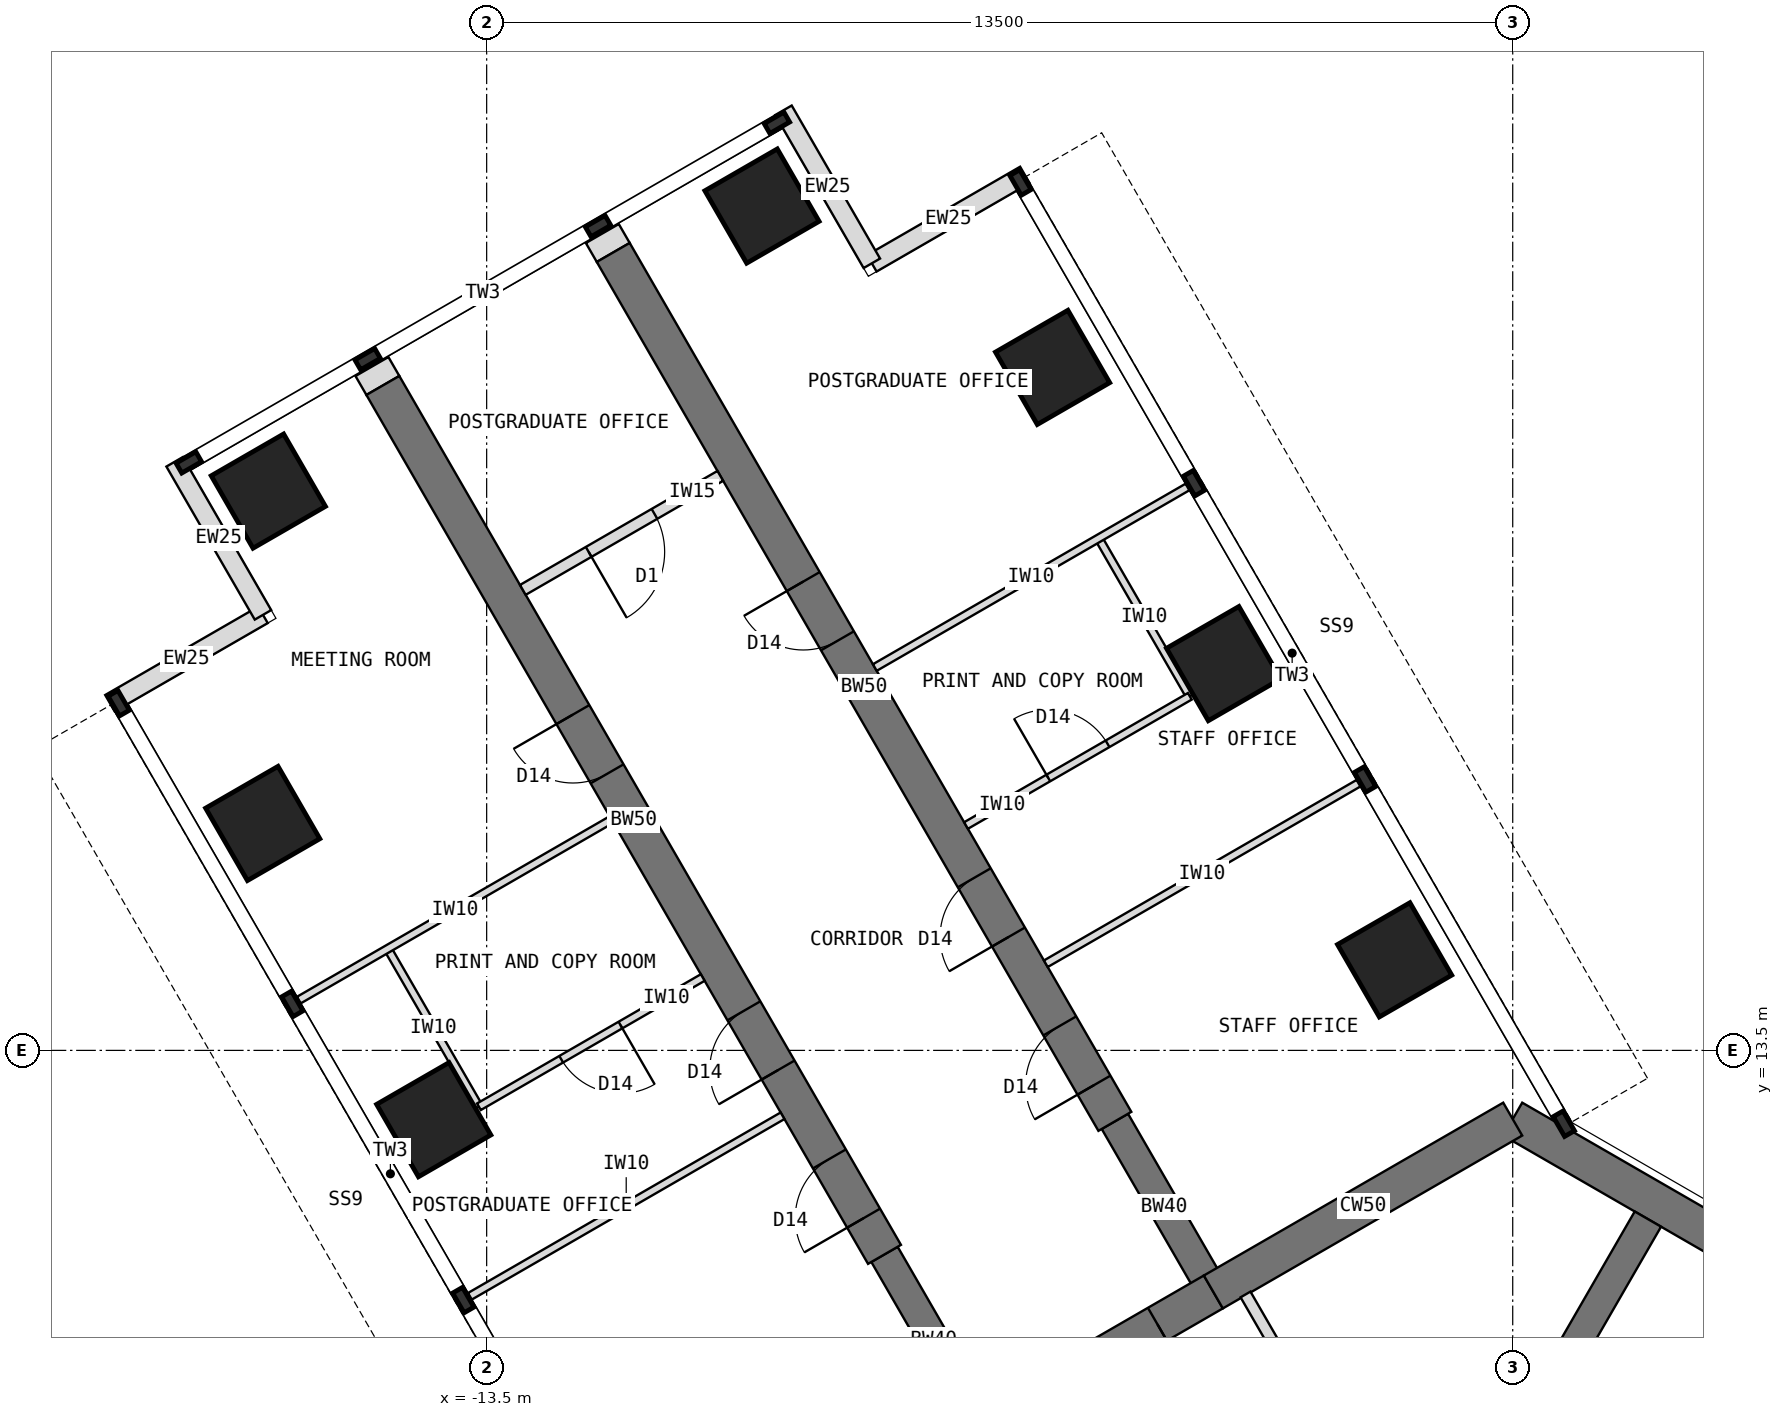
"""IFC4 building model, lengths in metres.
Left out: names, types, materials, properties, quantities, classifications, styles, units other than length and angle.
Written with IfcOpenShell. Run it as: python <this file> out.ifc"""

import sys

from ifc_helpers import new_model, si_unit, direction, frame, frame_2d, origin, origin_2d, place, context, subcontext, project, spatial, rectangle, extrude, element, fill, save


model = new_model("IFC4")
c1 = context("Model", 3, precision=1e-05, world=origin(), true_north=direction((0.0, 1.0)))
c2 = subcontext(c1, "Body", "Model", "MODEL_VIEW")
j1 = project(units=[si_unit("LENGTHUNIT", "METRE"), si_unit("PLANEANGLEUNIT", "RADIAN")], contexts=[c1])
p1 = place(None, origin())
s1 = spatial("IfcSite", under=j1, at=p1, CompositionType="ELEMENT")
p2 = place(p1, origin())
s2 = spatial("IfcBuilding", under=s1, at=p2, CompositionType="ELEMENT")
p3 = place(p2, frame((0.0, 0.0, 230.5)))
s3 = spatial("IfcBuildingStorey", under=s2, at=p3, CompositionType="ELEMENT", Elevation=230.5)
p4 = place(p3, frame((10.908, 6.298, 0.0), z_axis=(0.0, 0.0, 1.0), x_axis=(-0.866021940709, 0.500005998175, 0.0)))
e1 = element("IfcWall", 1, at=p4, inside=s3, PredefinedType="SHEAR", context=c2, shape_type="SweptSolid", body=[
    extrude(rectangle(XDim=12.596, YDim=0.5, at=frame_2d((6.298, 0.0))), origin(), (0.0, 0.0, 1.0), 4.0),
])
p5 = place(p3, frame((0.0, 12.596, 0.0), z_axis=(0.0, 0.0, 1.0), x_axis=(-0.866011268655, -0.500024481964, 0.0)))
e2 = element("IfcWall", 2, at=p5, inside=s3, PredefinedType="SHEAR", context=c2, shape_type="SweptSolid", body=[
    extrude(rectangle(XDim=4.548, YDim=0.5, at=frame_2d((2.274, 0.0))), origin(), (0.0, 0.0, 1.0), 4.0),
])
p6 = place(p3, frame((-3.939, 10.322, 0.0), z_axis=(0.0, 0.0, 1.0), x_axis=(-0.866019471182, -0.500010275428, 0.0)))
e3 = element("IfcWall", 3, at=p6, inside=s3, PredefinedType="SHEAR", context=c2, shape_type="SweptSolid", body=[
    extrude(rectangle(XDim=3.5, YDim=0.5, at=frame_2d((1.75, 0.0))), origin(), (0.0, 0.0, 1.0), 4.0),
])
p7 = place(p6, frame((0.85, 0.0, 0.0)))
e4 = element("IfcOpeningElement", 4, at=p7, cuts=e3, PredefinedType="OPENING", context=c2, shape_type="SweptSolid", body=[
    extrude(rectangle(XDim=1.8, YDim=2.1, at=frame_2d((0.9, 1.05))), frame((0.0, 0.26, 0.0), z_axis=(0.0, -1.0, 0.0), x_axis=(1.0, 0.0, 0.0)), (0.0, 0.0, 1.0), 0.52),
])
p8 = place(p3, frame((-6.97, 8.572, 0.0), z_axis=(0.0, 0.0, 1.0), x_axis=(-0.499988811324, 0.866031863473, 0.0)))
e5 = element("IfcWall", 5, at=p8, inside=s3, PredefinedType="SHEAR", context=c2, shape_type="SweptSolid", body=[
    extrude(rectangle(XDim=2.592, YDim=0.4, at=frame_2d((1.296, 0.0))), origin(), (0.0, 0.0, 1.0), 4.0),
])
p9 = place(p3, frame((-8.266, 10.816, 0.0), z_axis=(0.0, 0.0, 1.0), x_axis=(-0.499996231654, 0.866027579429, 0.0)))
e6 = element("IfcWall", 6, at=p9, inside=s3, PredefinedType="SHEAR", context=c2, shape_type="SweptSolid", body=[
    extrude(rectangle(XDim=13.2, YDim=0.5, at=frame_2d((6.6, 0.0))), origin(), (0.0, 0.0, 1.0), 4.0),
])
p10 = place(p9, frame((0.55, 0.0, 0.0)))
e7 = element("IfcOpeningElement", 7, at=p10, cuts=e6, PredefinedType="OPENING", context=c2, shape_type="SweptSolid", body=[
    extrude(rectangle(XDim=0.9, YDim=2.1, at=frame_2d((0.45, 1.05))), frame((0.0, 0.26, 0.0), z_axis=(0.0, -1.0, 0.0), x_axis=(1.0, 0.0, 0.0)), (0.0, 0.0, 1.0), 0.52),
])
p11 = place(p9, frame((2.8, 0.0, 0.0)))
e8 = element("IfcOpeningElement", 8, at=p11, cuts=e6, PredefinedType="OPENING", context=c2, shape_type="SweptSolid", body=[
    extrude(rectangle(XDim=0.9, YDim=2.1, at=frame_2d((0.45, 1.05))), frame((0.0, 0.26, 0.0), z_axis=(0.0, -1.0, 0.0), x_axis=(1.0, 0.0, 0.0)), (0.0, 0.0, 1.0), 0.52),
])
p12 = place(p9, frame((7.3, 0.0, 0.0)))
e9 = element("IfcOpeningElement", 9, at=p12, cuts=e6, PredefinedType="OPENING", context=c2, shape_type="SweptSolid", body=[
    extrude(rectangle(XDim=0.9, YDim=2.1, at=frame_2d((0.45, 1.05))), frame((0.0, 0.26, 0.0), z_axis=(0.0, -1.0, 0.0), x_axis=(1.0, 0.0, 0.0)), (0.0, 0.0, 1.0), 0.52),
])
p13 = place(p3, frame((-3.939, 10.322, 0.0), z_axis=(0.0, 0.0, 1.0), x_axis=(-0.499918158782, 0.866072649678, 0.0)))
e10 = element("IfcWall", 10, at=p13, inside=s3, PredefinedType="SHEAR", context=c2, shape_type="SweptSolid", body=[
    extrude(rectangle(XDim=2.592, YDim=0.4, at=frame_2d((1.296, 0.0))), origin(), (0.0, 0.0, 1.0), 4.0),
])
p14 = place(p3, frame((-5.234, 12.566, 0.0), z_axis=(0.0, 0.0, 1.0), x_axis=(-0.500010103361, 0.866019570528, 0.0)))
e11 = element("IfcWall", 11, at=p14, inside=s3, PredefinedType="SHEAR", context=c2, shape_type="SweptSolid", body=[
    extrude(rectangle(XDim=13.2, YDim=0.5, at=frame_2d((6.6, 0.0))), origin(), (0.0, 0.0, 1.0), 4.0),
])
p15 = place(p14, frame((0.55, 0.0, 0.0)))
e12 = element("IfcOpeningElement", 12, at=p15, cuts=e11, PredefinedType="OPENING", context=c2, shape_type="SweptSolid", body=[
    extrude(rectangle(XDim=0.9, YDim=2.1, at=frame_2d((0.45, 1.05))), frame((0.0, 0.26, 0.0), z_axis=(0.0, -1.0, 0.0), x_axis=(1.0, 0.0, 0.0)), (0.0, 0.0, 1.0), 0.52),
])
p16 = place(p14, frame((2.8, 0.0, 0.0)))
e13 = element("IfcOpeningElement", 13, at=p16, cuts=e11, PredefinedType="OPENING", context=c2, shape_type="SweptSolid", body=[
    extrude(rectangle(XDim=0.9, YDim=2.1, at=frame_2d((0.45, 1.05))), frame((0.0, 0.26, 0.0), z_axis=(0.0, -1.0, 0.0), x_axis=(1.0, 0.0, 0.0)), (0.0, 0.0, 1.0), 0.52),
])
p17 = place(p14, frame((7.3, 0.0, 0.0)))
e14 = element("IfcOpeningElement", 14, at=p17, cuts=e11, PredefinedType="OPENING", context=c2, shape_type="SweptSolid", body=[
    extrude(rectangle(XDim=0.9, YDim=2.1, at=frame_2d((0.45, 1.05))), frame((0.0, 0.26, 0.0), z_axis=(0.0, -1.0, 0.0), x_axis=(1.0, 0.0, 0.0)), (0.0, 0.0, 1.0), 0.52),
])
for number, where, z_axis, x_axis in (
    (15, (-1.554, 14.691, 0.0), (0.0, 0.0, 1.0), (0.866, 0.5, 0.0)),
    (16, (-14.196, 12.588, 0.0), (0.0, 0.0, 1.0), (0.866, 0.5, 0.0)),
    (17, (-3.804, 18.588, 0.0), (0.0, 0.0, 1.0), (0.866, 0.5, 0.0)),
    (18, (-16.446, 16.486, 0.0), (0.0, 0.0, 1.0), (0.866, 0.5, 0.0)),
    (19, (-6.054, 22.486, 0.0), (0.0, 0.0, 1.0), (0.866, 0.5, 0.0)),
    (20, (-16.373, 20.858, 0.0), (0.0, 0.0, 1.0), (0.866, 0.5, 0.0)),
    (21, (-9.877, 24.608, 0.0), (0.0, 0.0, 1.0), (0.866, 0.5, 0.0)),
):
    element("IfcColumn", number, at=place(p3, frame(where, z_axis=z_axis, x_axis=x_axis)), inside=s3, PredefinedType="COLUMN", context=c2, shape_type="SweptSolid", body=[
        extrude(rectangle(XDim=1.1, YDim=1.1, at=origin_2d()), origin(), (0.0, 0.0, 1.0), 4.0),
    ])
for number, where, z_axis, x_axis in (
    (22, (-18.456, 18.067, 0.0), (0.0, 0.0, 1.0), (0.866, 0.5, 0.0)),
    (23, (-16.443, 19.23, 0.0), (0.0, 0.0, 1.0), (-0.5, 0.866, 0.0)),
    (24, (-6.419, 25.017, 0.0), (0.0, 0.0, 1.0), (-0.866, -0.5, 0.0)),
    (25, (-8.432, 23.855, 0.0), (0.0, 0.0, 1.0), (-0.5, 0.866, 0.0)),
):
    element("IfcWall", number, at=place(p3, frame(where, z_axis=z_axis, x_axis=x_axis)), inside=s3, PredefinedType="STANDARD", context=c2, shape_type="SweptSolid", body=[
        extrude(rectangle(XDim=2.325, YDim=0.25, at=frame_2d((1.163, 0.0))), origin(), (0.0, 0.0, 1.0), 3.8),
    ])
for number, where, z_axis, x_axis in (
    (26, (-14.865, 22.248, 0.0), (0.0, 0.0, 1.0), (-0.5, 0.866, 0.0)),
    (27, (-11.834, 23.998, 0.0), (0.0, 0.0, 1.0), (-0.5, 0.866, 0.0)),
):
    element("IfcWall", number, at=place(p3, frame(where, z_axis=z_axis, x_axis=x_axis)), inside=s3, PredefinedType="PARTITIONING", context=c2, shape_type="SweptSolid", body=[
        extrude(rectangle(XDim=0.288, YDim=0.5, at=frame_2d((0.144, 0.0))), origin(), (0.0, 0.0, 1.0), 3.8),
    ])
p18 = place(p3, frame((-1.201, 6.12, 0.0), z_axis=(0.0, 0.0, 1.0), x_axis=(0.500021575205, 0.866012946976, 0.0)))
e28 = element("IfcWall", 28, at=p18, inside=s3, PredefinedType="SHEAR", context=c2, shape_type="SweptSolid", body=[
    extrude(rectangle(XDim=5.958, YDim=0.4, at=frame_2d((2.979, 0.0))), origin(), (0.0, 0.0, 1.0), 4.0),
])
for number, where, z_axis, x_axis in (
    (29, (-9.607, 12.64, 0.0), (0.0, 0.0, 1.0), (-0.866, -0.5, 0.0)),
    (30, (-11.857, 16.537, 0.0), (0.0, 0.0, 1.0), (-0.866, -0.5, 0.0)),
):
    element("IfcWall", number, at=place(p3, frame(where, z_axis=z_axis, x_axis=x_axis)), inside=s3, PredefinedType="PARTITIONING", context=c2, shape_type="SweptSolid", body=[
        extrude(rectangle(XDim=4.75, YDim=0.1, at=frame_2d((2.375, 0.0))), origin(), (0.0, 0.0, 1.0), 3.8),
    ])
p19 = place(p3, frame((-13.602, 12.759, 0.0), z_axis=(0.0, 0.0, 1.0), x_axis=(-0.500001309137, 0.866024647952, 0.0)))
e31 = element("IfcWall", 31, at=p19, inside=s3, PredefinedType="PARTITIONING", context=c2, shape_type="SweptSolid", body=[
    extrude(rectangle(XDim=2.4, YDim=0.1, at=frame_2d((1.2, 0.0))), origin(), (0.0, 0.0, 1.0), 3.8),
])
p20 = place(p3, frame((-10.657, 14.458, 0.0), z_axis=(0.0, 0.0, 1.0), x_axis=(-0.866038511948, -0.499977295307, 0.0)))
e32 = element("IfcWall", 32, at=p20, inside=s3, PredefinedType="PARTITIONING", context=c2, shape_type="SweptSolid", body=[
    extrude(rectangle(XDim=3.4, YDim=0.1, at=frame_2d((1.7, 0.0))), origin(), (0.0, 0.0, 1.0), 3.8),
])
p21 = place(p20, frame((1.25, 0.0, 0.0)))
e33 = element("IfcOpeningElement", 33, at=p21, cuts=e32, PredefinedType="OPENING", context=c2, shape_type="SweptSolid", body=[
    extrude(rectangle(XDim=0.9, YDim=2.1, at=frame_2d((0.45, 1.05))), frame((0.0, 0.06, 0.0), z_axis=(0.0, -1.0, 0.0), x_axis=(1.0, 0.0, 0.0)), (0.0, 0.0, 1.0), 0.12),
])
for number, where, z_axis, x_axis in (
    (34, (-6.143, 14.64, 0.0), (0.0, 0.0, 1.0), (0.866, 0.5, 0.0)),
    (35, (-8.393, 18.537, 0.0), (0.0, 0.0, 1.0), (0.866, 0.5, 0.0)),
):
    element("IfcWall", number, at=place(p3, frame(where, z_axis=z_axis, x_axis=x_axis)), inside=s3, PredefinedType="PARTITIONING", context=c2, shape_type="SweptSolid", body=[
        extrude(rectangle(XDim=4.75, YDim=0.1, at=frame_2d((2.375, 0.0))), origin(), (0.0, 0.0, 1.0), 3.8),
    ])
p22 = place(p3, frame((-4.249, 18.158, 0.0), z_axis=(0.0, 0.0, 1.0), x_axis=(-0.499957262057, 0.866050077142, 0.0)))
e36 = element("IfcWall", 36, at=p22, inside=s3, PredefinedType="PARTITIONING", context=c2, shape_type="SweptSolid", body=[
    extrude(rectangle(XDim=2.4, YDim=0.1, at=frame_2d((1.2, 0.0))), origin(), (0.0, 0.0, 1.0), 3.8),
])
p23 = place(p3, frame((-7.193, 16.458, 0.0), z_axis=(0.0, 0.0, 1.0), x_axis=(0.866020560687, 0.500008388397, 0.0)))
e37 = element("IfcWall", 37, at=p23, inside=s3, PredefinedType="PARTITIONING", context=c2, shape_type="SweptSolid", body=[
    extrude(rectangle(XDim=3.4, YDim=0.1, at=frame_2d((1.7, 0.0))), origin(), (0.0, 0.0, 1.0), 3.8),
])
p24 = place(p23, frame((1.25, 0.0, 0.0)))
e38 = element("IfcOpeningElement", 38, at=p24, cuts=e37, PredefinedType="OPENING", context=c2, shape_type="SweptSolid", body=[
    extrude(rectangle(XDim=0.9, YDim=2.1, at=frame_2d((0.45, 1.05))), frame((0.0, 0.06, 0.0), z_axis=(0.0, -1.0, 0.0), x_axis=(1.0, 0.0, 0.0)), (0.0, 0.0, 1.0), 0.12),
])
p25 = place(p3, frame((-3.515, 10.289, 0.0), z_axis=(0.0, 0.0, 1.0), x_axis=(0.499968392031, -0.866043651885, 0.0)))
e39 = element("IfcWall", 39, at=p25, inside=s3, PredefinedType="PARTITIONING", context=c2, shape_type="SweptSolid", body=[
    extrude(rectangle(XDim=4.526, YDim=0.15, at=frame_2d((2.263, 0.0))), origin(), (0.0, 0.0, 1.0), 3.8),
])
p26 = place(p25, frame((2.668, 0.0, 0.0)))
e40 = element("IfcOpeningElement", 40, at=p26, cuts=e39, PredefinedType="OPENING", context=c2, shape_type="SweptSolid", body=[
    extrude(rectangle(XDim=1.0, YDim=2.1, at=frame_2d((0.5, 1.05))), frame((0.0, 0.085, 0.0), z_axis=(0.0, -1.0, 0.0), x_axis=(1.0, 0.0, 0.0)), (0.0, 0.0, 1.0), 0.17),
])
p27 = place(p3, frame((-10.426, 21.058, 0.0), z_axis=(0.0, 0.0, 1.0), x_axis=(-0.866010750942, -0.50002537861, 0.0)))
e41 = element("IfcWall", 41, at=p27, inside=s3, PredefinedType="PARTITIONING", context=c2, shape_type="SweptSolid", body=[
    extrude(rectangle(XDim=3.0, YDim=0.15, at=frame_2d((1.5, 0.0))), origin(), (0.0, 0.0, 1.0), 3.8),
])
p28 = place(p27, frame((1.0, 0.0, 0.0)))
e42 = element("IfcOpeningElement", 42, at=p28, cuts=e41, PredefinedType="OPENING", context=c2, shape_type="SweptSolid", body=[
    extrude(rectangle(XDim=1.0, YDim=2.1, at=frame_2d((0.5, 1.05))), frame((0.0, 0.085, 0.0), z_axis=(0.0, -1.0, 0.0), x_axis=(1.0, 0.0, 0.0)), (0.0, 0.0, 1.0), 0.17),
])
p29 = place(p7, origin())
e43 = element("IfcDoor", 43, at=p29, inside=s3, OperationType="DOUBLE_DOOR_DOUBLE_SWING", PredefinedType="DOOR", context=c2, shape_type="SweptSolid", body=[
    extrude(rectangle(XDim=1.8, YDim=2.1, at=frame_2d((0.9, 1.05))), frame((0.0, 0.025, 0.0), z_axis=(0.0, -1.0, 0.0), x_axis=(1.0, 0.0, 0.0)), (0.0, 0.0, 1.0), 0.05),
])
fill(e4, e43)
p30 = place(p21, origin())
e44 = element("IfcDoor", 44, at=p30, inside=s3, OperationType="SINGLE_SWING_LEFT", PredefinedType="DOOR", context=c2, shape_type="SweptSolid", body=[
    extrude(rectangle(XDim=0.9, YDim=2.1, at=frame_2d((0.45, 1.05))), frame((0.0, 0.025, 0.0), z_axis=(0.0, -1.0, 0.0), x_axis=(1.0, 0.0, 0.0)), (0.0, 0.0, 1.0), 0.05),
])
fill(e33, e44)
p31 = place(p24, origin())
e45 = element("IfcDoor", 45, at=p31, inside=s3, OperationType="SINGLE_SWING_LEFT", PredefinedType="DOOR", context=c2, shape_type="SweptSolid", body=[
    extrude(rectangle(XDim=0.9, YDim=2.1, at=frame_2d((0.45, 1.05))), frame((0.0, 0.025, 0.0), z_axis=(0.0, -1.0, 0.0), x_axis=(1.0, 0.0, 0.0)), (0.0, 0.0, 1.0), 0.05),
])
fill(e38, e45)
p32 = place(p28, origin())
e46 = element("IfcDoor", 46, at=p32, inside=s3, OperationType="SINGLE_SWING_RIGHT", PredefinedType="DOOR", context=c2, shape_type="SweptSolid", body=[
    extrude(rectangle(XDim=1.0, YDim=2.1, at=frame_2d((0.5, 1.05))), frame((0.0, 0.025, 0.0), z_axis=(0.0, -1.0, 0.0), x_axis=(1.0, 0.0, 0.0)), (0.0, 0.0, 1.0), 0.05),
])
fill(e42, e46)
p33 = place(p10, origin())
e47 = element("IfcDoor", 47, at=p33, inside=s3, OperationType="SINGLE_SWING_LEFT", PredefinedType="DOOR", context=c2, shape_type="SweptSolid", body=[
    extrude(rectangle(XDim=0.9, YDim=2.1, at=frame_2d((0.45, 1.05))), frame((0.0, 0.025, 0.0), z_axis=(0.0, -1.0, 0.0), x_axis=(1.0, 0.0, 0.0)), (0.0, 0.0, 1.0), 0.05),
])
fill(e7, e47)
p34 = place(p11, origin())
e48 = element("IfcDoor", 48, at=p34, inside=s3, OperationType="SINGLE_SWING_LEFT", PredefinedType="DOOR", context=c2, shape_type="SweptSolid", body=[
    extrude(rectangle(XDim=0.9, YDim=2.1, at=frame_2d((0.45, 1.05))), frame((0.0, 0.025, 0.0), z_axis=(0.0, -1.0, 0.0), x_axis=(1.0, 0.0, 0.0)), (0.0, 0.0, 1.0), 0.05),
])
fill(e8, e48)
p35 = place(p12, origin())
e49 = element("IfcDoor", 49, at=p35, inside=s3, OperationType="SINGLE_SWING_RIGHT", PredefinedType="DOOR", context=c2, shape_type="SweptSolid", body=[
    extrude(rectangle(XDim=0.9, YDim=2.1, at=frame_2d((0.45, 1.05))), frame((0.0, 0.025, 0.0), z_axis=(0.0, -1.0, 0.0), x_axis=(1.0, 0.0, 0.0)), (0.0, 0.0, 1.0), 0.05),
])
fill(e9, e49)
p36 = place(p15, origin())
e50 = element("IfcDoor", 50, at=p36, inside=s3, OperationType="SINGLE_SWING_LEFT", PredefinedType="DOOR", context=c2, shape_type="SweptSolid", body=[
    extrude(rectangle(XDim=0.9, YDim=2.1, at=frame_2d((0.45, 1.05))), frame((0.0, 0.025, 0.0), z_axis=(0.0, -1.0, 0.0), x_axis=(1.0, 0.0, 0.0)), (0.0, 0.0, 1.0), 0.05),
])
fill(e12, e50)
p37 = place(p16, origin())
e51 = element("IfcDoor", 51, at=p37, inside=s3, OperationType="SINGLE_SWING_LEFT", PredefinedType="DOOR", context=c2, shape_type="SweptSolid", body=[
    extrude(rectangle(XDim=0.9, YDim=2.1, at=frame_2d((0.45, 1.05))), frame((0.0, 0.025, 0.0), z_axis=(0.0, -1.0, 0.0), x_axis=(1.0, 0.0, 0.0)), (0.0, 0.0, 1.0), 0.05),
])
fill(e13, e51)
p38 = place(p17, origin())
e52 = element("IfcDoor", 52, at=p38, inside=s3, OperationType="SINGLE_SWING_RIGHT", PredefinedType="DOOR", context=c2, shape_type="SweptSolid", body=[
    extrude(rectangle(XDim=0.9, YDim=2.1, at=frame_2d((0.45, 1.05))), frame((0.0, 0.025, 0.0), z_axis=(0.0, -1.0, 0.0), x_axis=(1.0, 0.0, 0.0)), (0.0, 0.0, 1.0), 0.05),
])
fill(e14, e52)
save(model, sys.argv[1])
